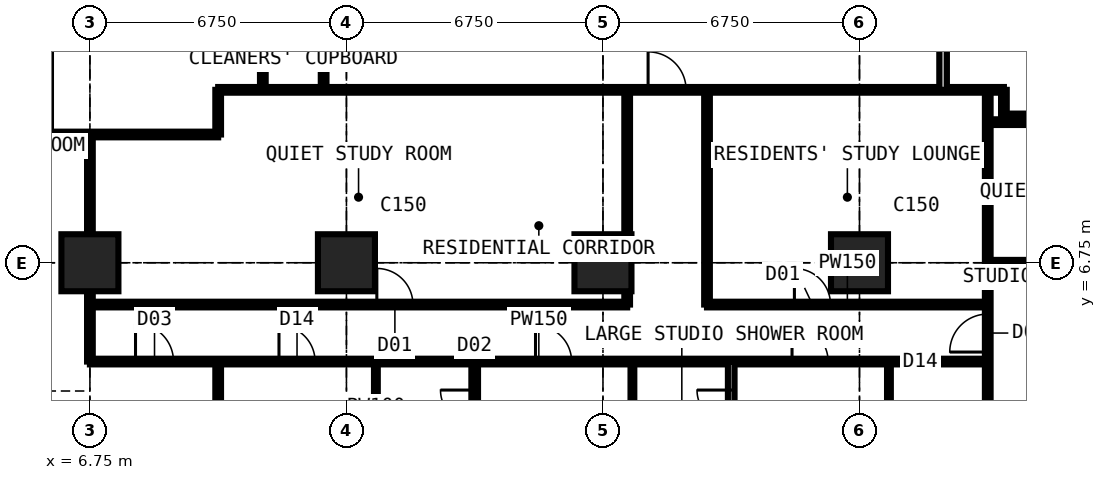
"""IFC4 building model, lengths in metres.
Left out: names, types, materials, properties, quantities, classifications, styles, units other than length and angle.
Written with IfcOpenShell. Run it as: python <this file> out.ifc"""

import sys

from ifc_helpers import new_model, si_unit, direction, frame, frame_2d, origin, origin_2d, place, context, subcontext, project, spatial, rectangle, extrude, element, fill, save


model = new_model("IFC4")
c1 = context("Model", 3, precision=1e-05, world=origin(), true_north=direction((0.0, 1.0)))
c2 = subcontext(c1, "Body", "Model", "MODEL_VIEW")
j1 = project(units=[si_unit("LENGTHUNIT", "METRE"), si_unit("PLANEANGLEUNIT", "RADIAN")], contexts=[c1])
p1 = place(None, origin())
s1 = spatial("IfcSite", under=j1, at=p1, CompositionType="ELEMENT")
p2 = place(p1, origin())
s2 = spatial("IfcBuilding", under=s1, at=p2, CompositionType="ELEMENT")
p3 = place(p2, frame((0.0, 0.0, 112.5)))
s3 = spatial("IfcBuildingStorey", under=s2, at=p3, CompositionType="ELEMENT", Elevation=112.5)
for number, where, z_axis, x_axis in (
    (1, (6.75, 6.75, 0.0), (0.0, 0.0, 1.0), (1.0, 0.0, 0.0)),
    (2, (13.5, 6.75, 0.0), (0.0, 0.0, 1.0), (1.0, 0.0, 0.0)),
    (3, (20.25, 6.75, 0.0), (0.0, 0.0, 1.0), (1.0, 0.0, 0.0)),
    (4, (27.0, 6.75, 0.0), (0.0, 0.0, 1.0), (1.0, 0.0, 0.0)),
):
    element("IfcColumn", number, at=place(p3, frame(where, z_axis=z_axis, x_axis=x_axis)), inside=s3, PredefinedType="COLUMN", context=c2, shape_type="SweptSolid", body=[
        extrude(rectangle(XDim=1.5, YDim=1.5, at=origin_2d()), origin(), (0.0, 0.0, 1.0), 3.6),
    ])
p4 = place(p3, frame((-0.734, 10.125, 0.0), z_axis=(0.0, 0.0, 1.0), x_axis=(1.0, 0.0, 0.0)))
e5 = element("IfcWall", 5, at=p4, inside=s3, PredefinedType="PARTITIONING", context=c2, shape_type="SweptSolid", body=[
    extrude(rectangle(XDim=10.859, YDim=0.15, at=frame_2d((5.429, 0.0))), origin(), (0.0, 0.0, 1.0), 3.375),
])
p5 = place(p3, frame((6.75, 4.15, 0.0), z_axis=(0.0, 0.0, 1.0), x_axis=(0.0, 1.0, 0.0)))
e6 = element("IfcWall", 6, at=p5, inside=s3, PredefinedType="PARTITIONING", context=c2, shape_type="SweptSolid", body=[
    extrude(rectangle(XDim=5.975, YDim=0.15, at=frame_2d((2.988, 0.0))), origin(), (0.0, 0.0, 1.0), 2.877),
])
p6 = place(p3, frame((6.75, 4.15, 0.0), z_axis=(0.0, 0.0, 1.0), x_axis=(1.0, 0.0, 0.0)))
e7 = element("IfcWall", 7, at=p6, inside=s3, PredefinedType="PARTITIONING", context=c2, shape_type="SweptSolid", body=[
    extrude(rectangle(XDim=23.625, YDim=0.15, at=frame_2d((11.812, 0.0))), origin(), (0.0, 0.0, 1.0), 3.375),
])
p7 = place(p6, frame((1.2, 0.0, 0.0)))
e8 = element("IfcOpeningElement", 8, at=p7, cuts=e7, PredefinedType="OPENING", context=c2, shape_type="SweptSolid", body=[
    extrude(rectangle(XDim=1.0, YDim=2.2, at=frame_2d((0.5, 1.1))), frame((0.0, 0.085, 0.0), z_axis=(0.0, -1.0, 0.0), x_axis=(1.0, 0.0, 0.0)), (0.0, 0.0, 1.0), 0.17),
])
p8 = place(p6, frame((18.475, 0.0, 0.0)))
e9 = element("IfcOpeningElement", 9, at=p8, cuts=e7, PredefinedType="OPENING", context=c2, shape_type="SweptSolid", body=[
    extrude(rectangle(XDim=0.95, YDim=2.2, at=frame_2d((0.475, 1.1))), frame((0.0, 0.085, 0.0), z_axis=(0.0, -1.0, 0.0), x_axis=(1.0, 0.0, 0.0)), (0.0, 0.0, 1.0), 0.17),
])
p9 = place(p6, frame((11.725, 0.0, 0.0)))
e10 = element("IfcOpeningElement", 10, at=p9, cuts=e7, PredefinedType="OPENING", context=c2, shape_type="SweptSolid", body=[
    extrude(rectangle(XDim=0.95, YDim=2.2, at=frame_2d((0.475, 1.1))), frame((0.0, 0.085, 0.0), z_axis=(0.0, -1.0, 0.0), x_axis=(1.0, 0.0, 0.0)), (0.0, 0.0, 1.0), 0.17),
])
p10 = place(p6, frame((4.975, 0.0, 0.0)))
e11 = element("IfcOpeningElement", 11, at=p10, cuts=e7, PredefinedType="OPENING", context=c2, shape_type="SweptSolid", body=[
    extrude(rectangle(XDim=0.95, YDim=2.2, at=frame_2d((0.475, 1.1))), frame((0.0, 0.085, 0.0), z_axis=(0.0, -1.0, 0.0), x_axis=(1.0, 0.0, 0.0)), (0.0, 0.0, 1.0), 0.17),
])
p11 = place(p3, frame((6.75, 5.65, 0.0), z_axis=(0.0, 0.0, 1.0), x_axis=(1.0, 0.0, 0.0)))
e12 = element("IfcWall", 12, at=p11, inside=s3, PredefinedType="PARTITIONING", context=c2, shape_type="SweptSolid", body=[
    extrude(rectangle(XDim=14.137, YDim=0.15, at=frame_2d((7.069, 0.0))), origin(), (0.0, 0.0, 1.0), 3.375),
])
p12 = place(p11, frame((7.55, 0.0, 0.0)))
e13 = element("IfcOpeningElement", 13, at=p12, cuts=e12, PredefinedType="OPENING", context=c2, shape_type="SweptSolid", body=[
    extrude(rectangle(XDim=0.95, YDim=2.2, at=frame_2d((0.475, 1.1))), frame((0.0, 0.085, 0.0), z_axis=(0.0, -1.0, 0.0), x_axis=(1.0, 0.0, 0.0)), (0.0, 0.0, 1.0), 0.17),
])
p13 = place(p3, frame((10.125, -0.734, 0.0), z_axis=(0.0, 0.0, 1.0), x_axis=(0.0, 1.0, 0.0)))
e14 = element("IfcWall", 14, at=p13, inside=s3, PredefinedType="PARTITIONING", context=c2, shape_type="SweptSolid", body=[
    extrude(rectangle(XDim=4.884, YDim=0.15, at=frame_2d((2.442, 0.0))), origin(), (0.0, 0.0, 1.0), 3.375),
])
p14 = place(p3, frame((10.125, 10.125, 0.0), z_axis=(0.0, 0.0, 1.0), x_axis=(0.0, 1.0, 0.0)))
e15 = element("IfcWall", 15, at=p14, inside=s3, PredefinedType="PARTITIONING", context=c2, shape_type="SweptSolid", body=[
    extrude(rectangle(XDim=1.175, YDim=0.15, at=frame_2d((0.587, 0.0))), origin(), (0.0, 0.0, 1.0), 3.375),
])
p15 = place(p3, frame((10.125, 11.3, 0.0), z_axis=(0.0, 0.0, 1.0), x_axis=(1.0, 0.0, 0.0)))
e16 = element("IfcWall", 16, at=p15, inside=s3, PredefinedType="PARTITIONING", context=c2, shape_type="SweptSolid", body=[
    extrude(rectangle(XDim=20.675, YDim=0.15, at=frame_2d((10.337, 0.0))), origin(), (0.0, 0.0, 1.0), 3.375),
])
p16 = place(p15, frame((11.312, 0.0, 0.0)))
e17 = element("IfcOpeningElement", 17, at=p16, cuts=e16, PredefinedType="OPENING", context=c2, shape_type="SweptSolid", body=[
    extrude(rectangle(XDim=1.0, YDim=2.2, at=frame_2d((0.5, 1.1))), frame((0.0, 0.085, 0.0), z_axis=(0.0, -1.0, 0.0), x_axis=(1.0, 0.0, 0.0)), (0.0, 0.0, 1.0), 0.17),
])
p17 = place(p3, frame((11.3, 11.3, 0.0), z_axis=(0.0, 0.0, 1.0), x_axis=(0.0, 1.0, 0.0)))
e18 = element("IfcWall", 18, at=p17, inside=s3, PredefinedType="PARTITIONING", context=c2, shape_type="SweptSolid", body=[
    extrude(rectangle(XDim=19.3, YDim=0.15, at=frame_2d((9.65, 0.0))), origin(), (0.0, 0.0, 1.0), 3.375),
])
p18 = place(p17, frame((18.1, 0.0, 0.0)))
e19 = element("IfcOpeningElement", 19, at=p18, cuts=e18, PredefinedType="OPENING", context=c2, shape_type="SweptSolid", body=[
    extrude(rectangle(XDim=1.0, YDim=2.2, at=frame_2d((0.5, 1.1))), frame((0.0, 0.085, 0.0), z_axis=(0.0, -1.0, 0.0), x_axis=(1.0, 0.0, 0.0)), (0.0, 0.0, 1.0), 0.17),
])
p19 = place(p17, frame((10.137, 0.0, 0.0)))
e20 = element("IfcOpeningElement", 20, at=p19, cuts=e18, PredefinedType="OPENING", context=c2, shape_type="SweptSolid", body=[
    extrude(rectangle(XDim=1.0, YDim=2.2, at=frame_2d((0.5, 1.1))), frame((0.0, 0.085, 0.0), z_axis=(0.0, -1.0, 0.0), x_axis=(1.0, 0.0, 0.0)), (0.0, 0.0, 1.0), 0.17),
])
p20 = place(p3, frame((12.9, 11.3, 0.0), z_axis=(0.0, 0.0, 1.0), x_axis=(0.0, 1.0, 0.0)))
e21 = element("IfcWall", 21, at=p20, inside=s3, PredefinedType="PARTITIONING", context=c2, shape_type="SweptSolid", body=[
    extrude(rectangle(XDim=1.6, YDim=0.15, at=frame_2d((0.8, 0.0))), origin(), (0.0, 0.0, 1.0), 3.375),
])
p21 = place(p3, frame((14.275, 1.75, 0.0), z_axis=(0.0, 0.0, 1.0), x_axis=(0.0, 1.0, 0.0)))
e22 = element("IfcWall", 22, at=p21, inside=s3, PredefinedType="PARTITIONING", context=c2, shape_type="SweptSolid", body=[
    extrude(rectangle(XDim=2.4, YDim=0.1, at=frame_2d((1.2, 0.0))), origin(), (0.0, 0.0, 1.0), 3.375),
])
p22 = place(p3, frame((16.875, -0.734, 0.0), z_axis=(0.0, 0.0, 1.0), x_axis=(0.0, 1.0, 0.0)))
e23 = element("IfcWall", 23, at=p22, inside=s3, PredefinedType="PARTITIONING", context=c2, shape_type="SweptSolid", body=[
    extrude(rectangle(XDim=4.884, YDim=0.175, at=frame_2d((2.442, 0.0))), origin(), (0.0, 0.0, 1.0), 3.375),
])
p23 = place(p22, frame((3.234, 0.0, 0.0)))
e24 = element("IfcOpeningElement", 24, at=p23, cuts=e23, PredefinedType="OPENING", context=c2, shape_type="SweptSolid", body=[
    extrude(rectangle(XDim=0.9, YDim=2.2, at=frame_2d((0.45, 1.1))), frame((0.0, 0.097, 0.0), z_axis=(0.0, -1.0, 0.0), x_axis=(1.0, 0.0, 0.0)), (0.0, 0.0, 1.0), 0.195),
])
p24 = place(p3, frame((20.887, 5.65, 0.0), z_axis=(0.0, 0.0, 1.0), x_axis=(0.0, 1.0, 0.0)))
e25 = element("IfcWall", 25, at=p24, inside=s3, PredefinedType="PARTITIONING", context=c2, shape_type="SweptSolid", body=[
    extrude(rectangle(XDim=5.65, YDim=0.15, at=frame_2d((2.825, 0.0))), origin(), (0.0, 0.0, 1.0), 3.375),
])
p25 = place(p3, frame((21.025, 1.75, 0.0), z_axis=(0.0, 0.0, 1.0), x_axis=(0.0, 1.0, 0.0)))
e26 = element("IfcWall", 26, at=p25, inside=s3, PredefinedType="PARTITIONING", context=c2, shape_type="SweptSolid", body=[
    extrude(rectangle(XDim=2.4, YDim=0.1, at=frame_2d((1.2, 0.0))), origin(), (0.0, 0.0, 1.0), 3.375),
])
p26 = place(p3, frame((22.988, 5.65, 0.0), z_axis=(0.0, 0.0, 1.0), x_axis=(1.0, 0.0, 0.0)))
e27 = element("IfcWall", 27, at=p26, inside=s3, PredefinedType="PARTITIONING", context=c2, shape_type="SweptSolid", body=[
    extrude(rectangle(XDim=7.387, YDim=0.15, at=frame_2d((3.694, 0.0))), origin(), (0.0, 0.0, 1.0), 3.375),
])
p27 = place(p26, frame((2.3, 0.0, 0.0)))
e28 = element("IfcOpeningElement", 28, at=p27, cuts=e27, PredefinedType="OPENING", context=c2, shape_type="SweptSolid", body=[
    extrude(rectangle(XDim=0.95, YDim=2.2, at=frame_2d((0.475, 1.1))), frame((0.0, 0.085, 0.0), z_axis=(0.0, -1.0, 0.0), x_axis=(1.0, 0.0, 0.0)), (0.0, 0.0, 1.0), 0.17),
])
p28 = place(p3, frame((22.988, 5.65, 0.0), z_axis=(0.0, 0.0, 1.0), x_axis=(0.0, 1.0, 0.0)))
e29 = element("IfcWall", 29, at=p28, inside=s3, PredefinedType="PARTITIONING", context=c2, shape_type="SweptSolid", body=[
    extrude(rectangle(XDim=5.65, YDim=0.15, at=frame_2d((2.825, 0.0))), origin(), (0.0, 0.0, 1.0), 3.375),
])
p29 = place(p3, frame((23.625, -0.734, 0.0), z_axis=(0.0, 0.0, 1.0), x_axis=(0.0, 1.0, 0.0)))
e30 = element("IfcWall", 30, at=p29, inside=s3, PredefinedType="PARTITIONING", context=c2, shape_type="SweptSolid", body=[
    extrude(rectangle(XDim=4.884, YDim=0.175, at=frame_2d((2.442, 0.0))), origin(), (0.0, 0.0, 1.0), 3.375),
])
p30 = place(p29, frame((3.234, 0.0, 0.0)))
e31 = element("IfcOpeningElement", 31, at=p30, cuts=e30, PredefinedType="OPENING", context=c2, shape_type="SweptSolid", body=[
    extrude(rectangle(XDim=0.9, YDim=2.2, at=frame_2d((0.45, 1.1))), frame((0.0, 0.097, 0.0), z_axis=(0.0, -1.0, 0.0), x_axis=(1.0, 0.0, 0.0)), (0.0, 0.0, 1.0), 0.195),
])
p31 = place(p3, frame((27.775, 1.75, 0.0), z_axis=(0.0, 0.0, 1.0), x_axis=(0.0, 1.0, 0.0)))
e32 = element("IfcWall", 32, at=p31, inside=s3, PredefinedType="PARTITIONING", context=c2, shape_type="SweptSolid", body=[
    extrude(rectangle(XDim=2.4, YDim=0.1, at=frame_2d((1.2, 0.0))), origin(), (0.0, 0.0, 1.0), 3.375),
])
p32 = place(p3, frame((29.2, 11.3, 0.0), z_axis=(0.0, 0.0, 1.0), x_axis=(0.0, 1.0, 0.0)))
e33 = element("IfcWall", 33, at=p32, inside=s3, PredefinedType="PARTITIONING", context=c2, shape_type="SweptSolid", body=[
    extrude(rectangle(XDim=17.9, YDim=0.2, at=frame_2d((8.95, 0.0))), origin(), (0.0, 0.0, 1.0), 3.375),
])
p33 = place(p32, frame((8.35, 0.0, 0.0)))
e34 = element("IfcOpeningElement", 34, at=p33, cuts=e33, PredefinedType="OPENING", context=c2, shape_type="SweptSolid", body=[
    extrude(rectangle(XDim=1.2, YDim=2.2, at=frame_2d((0.6, 1.1))), frame((0.0, 0.11, 0.0), z_axis=(0.0, -1.0, 0.0), x_axis=(1.0, 0.0, 0.0)), (0.0, 0.0, 1.0), 0.22),
])
p34 = place(p3, frame((30.375, -0.734, 0.0), z_axis=(0.0, 0.0, 1.0), x_axis=(0.0, 1.0, 0.0)))
e35 = element("IfcWall", 35, at=p34, inside=s3, PredefinedType="PARTITIONING", context=c2, shape_type="SweptSolid", body=[
    extrude(rectangle(XDim=12.034, YDim=0.15, at=frame_2d((6.017, 0.0))), origin(), (0.0, 0.0, 1.0), 3.375),
])
p35 = place(p34, frame((5.134, 0.0, 0.0)))
e36 = element("IfcOpeningElement", 36, at=p35, cuts=e35, PredefinedType="OPENING", context=c2, shape_type="SweptSolid", body=[
    extrude(rectangle(XDim=1.0, YDim=2.2, at=frame_2d((0.5, 1.1))), frame((0.0, 0.085, 0.0), z_axis=(0.0, -1.0, 0.0), x_axis=(1.0, 0.0, 0.0)), (0.0, 0.0, 1.0), 0.17),
])
p36 = place(p3, frame((30.375, 6.75, 0.0), z_axis=(0.0, 0.0, 1.0), x_axis=(1.0, 0.0, 0.0)))
e37 = element("IfcWall", 37, at=p36, inside=s3, PredefinedType="PARTITIONING", context=c2, shape_type="SweptSolid", body=[
    extrude(rectangle(XDim=5.975, YDim=0.15, at=frame_2d((2.988, 0.0))), origin(), (0.0, 0.0, 1.0), 2.877),
])
p37 = place(p3, frame((30.375, 10.45, 0.0), z_axis=(0.0, 0.0, 1.0), x_axis=(1.0, 0.0, 0.0)))
e38 = element("IfcWall", 38, at=p37, inside=s3, PredefinedType="PARTITIONING", context=c2, shape_type="SweptSolid", body=[
    extrude(rectangle(XDim=4.475, YDim=0.15, at=frame_2d((2.238, 0.0))), origin(), (0.0, 0.0, 1.0), 3.375),
])
p38 = place(p37, frame((2.35, 0.0, 0.0)))
e39 = element("IfcOpeningElement", 39, at=p38, cuts=e38, PredefinedType="OPENING", context=c2, shape_type="SweptSolid", body=[
    extrude(rectangle(XDim=0.95, YDim=2.2, at=frame_2d((0.475, 1.1))), frame((0.0, 0.085, 0.0), z_axis=(0.0, -1.0, 0.0), x_axis=(1.0, 0.0, 0.0)), (0.0, 0.0, 1.0), 0.17),
])
p39 = place(p3, frame((30.8, 10.6, 0.0), z_axis=(0.0, 0.0, 1.0), x_axis=(0.0, 1.0, 0.0)))
e40 = element("IfcWall", 40, at=p39, inside=s3, PredefinedType="PARTITIONING", context=c2, shape_type="SweptSolid", body=[
    extrude(rectangle(XDim=0.7, YDim=0.15, at=frame_2d((0.35, 0.0))), origin(), (0.0, 0.0, 1.0), 3.375),
])
p40 = place(p3, frame((30.8, 10.6, 0.0), z_axis=(0.0, 0.0, 1.0), x_axis=(1.0, 0.0, 0.0)))
e41 = element("IfcWall", 41, at=p40, inside=s3, PredefinedType="PARTITIONING", context=c2, shape_type="SweptSolid", body=[
    extrude(rectangle(XDim=1.85, YDim=0.15, at=frame_2d((0.925, 0.0))), origin(), (0.0, 0.0, 1.0), 3.375),
])
p41 = place(p7, origin())
e42 = element("IfcDoor", 42, at=p41, inside=s3, OperationType="SINGLE_SWING_LEFT", PredefinedType="DOOR", context=c2, shape_type="SweptSolid", body=[
    extrude(rectangle(XDim=1.0, YDim=2.2, at=frame_2d((0.5, 1.1))), frame((0.0, 0.025, 0.0), z_axis=(0.0, -1.0, 0.0), x_axis=(1.0, 0.0, 0.0)), (0.0, 0.0, 1.0), 0.05),
])
fill(e8, e42)
p42 = place(p8, origin())
e43 = element("IfcDoor", 43, at=p42, inside=s3, OperationType="SINGLE_SWING_LEFT", PredefinedType="DOOR", context=c2, shape_type="SweptSolid", body=[
    extrude(rectangle(XDim=0.95, YDim=2.2, at=frame_2d((0.475, 1.1))), frame((0.0, 0.025, 0.0), z_axis=(0.0, -1.0, 0.0), x_axis=(1.0, 0.0, 0.0)), (0.0, 0.0, 1.0), 0.05),
])
fill(e9, e43)
p43 = place(p9, origin())
e44 = element("IfcDoor", 44, at=p43, inside=s3, OperationType="SINGLE_SWING_LEFT", PredefinedType="DOOR", context=c2, shape_type="SweptSolid", body=[
    extrude(rectangle(XDim=0.95, YDim=2.2, at=frame_2d((0.475, 1.1))), frame((0.0, 0.025, 0.0), z_axis=(0.0, -1.0, 0.0), x_axis=(1.0, 0.0, 0.0)), (0.0, 0.0, 1.0), 0.05),
])
fill(e10, e44)
p44 = place(p30, origin())
e45 = element("IfcDoor", 45, at=p44, inside=s3, OperationType="SINGLE_SWING_RIGHT", PredefinedType="DOOR", context=c2, shape_type="SweptSolid", body=[
    extrude(rectangle(XDim=0.9, YDim=2.2, at=frame_2d((0.45, 1.1))), frame((0.0, 0.025, 0.0), z_axis=(0.0, -1.0, 0.0), x_axis=(1.0, 0.0, 0.0)), (0.0, 0.0, 1.0), 0.05),
])
fill(e31, e45)
p45 = place(p10, origin())
e46 = element("IfcDoor", 46, at=p45, inside=s3, OperationType="SINGLE_SWING_LEFT", PredefinedType="DOOR", context=c2, shape_type="SweptSolid", body=[
    extrude(rectangle(XDim=0.95, YDim=2.2, at=frame_2d((0.475, 1.1))), frame((0.0, 0.025, 0.0), z_axis=(0.0, -1.0, 0.0), x_axis=(1.0, 0.0, 0.0)), (0.0, 0.0, 1.0), 0.05),
])
fill(e11, e46)
p46 = place(p23, origin())
e47 = element("IfcDoor", 47, at=p46, inside=s3, OperationType="SINGLE_SWING_RIGHT", PredefinedType="DOOR", context=c2, shape_type="SweptSolid", body=[
    extrude(rectangle(XDim=0.9, YDim=2.2, at=frame_2d((0.45, 1.1))), frame((0.0, 0.025, 0.0), z_axis=(0.0, -1.0, 0.0), x_axis=(1.0, 0.0, 0.0)), (0.0, 0.0, 1.0), 0.05),
])
fill(e24, e47)
p47 = place(p16, origin())
e48 = element("IfcDoor", 48, at=p47, inside=s3, OperationType="SINGLE_SWING_LEFT", PredefinedType="DOOR", context=c2, shape_type="SweptSolid", body=[
    extrude(rectangle(XDim=1.0, YDim=2.2, at=frame_2d((0.5, 1.1))), frame((0.0, 0.025, 0.0), z_axis=(0.0, -1.0, 0.0), x_axis=(1.0, 0.0, 0.0)), (0.0, 0.0, 1.0), 0.05),
])
fill(e17, e48)
p48 = place(p27, origin())
e49 = element("IfcDoor", 49, at=p48, inside=s3, OperationType="SINGLE_SWING_LEFT", PredefinedType="DOOR", context=c2, shape_type="SweptSolid", body=[
    extrude(rectangle(XDim=0.95, YDim=2.2, at=frame_2d((0.475, 1.1))), frame((0.0, 0.025, 0.0), z_axis=(0.0, -1.0, 0.0), x_axis=(1.0, 0.0, 0.0)), (0.0, 0.0, 1.0), 0.05),
])
fill(e28, e49)
p49 = place(p12, origin())
e50 = element("IfcDoor", 50, at=p49, inside=s3, OperationType="SINGLE_SWING_LEFT", PredefinedType="DOOR", context=c2, shape_type="SweptSolid", body=[
    extrude(rectangle(XDim=0.95, YDim=2.2, at=frame_2d((0.475, 1.1))), frame((0.0, 0.025, 0.0), z_axis=(0.0, -1.0, 0.0), x_axis=(1.0, 0.0, 0.0)), (0.0, 0.0, 1.0), 0.05),
])
fill(e13, e50)
p50 = place(p35, origin())
e51 = element("IfcDoor", 51, at=p50, inside=s3, OperationType="SINGLE_SWING_LEFT", PredefinedType="DOOR", context=c2, shape_type="SweptSolid", body=[
    extrude(rectangle(XDim=1.0, YDim=2.2, at=frame_2d((0.5, 1.1))), frame((0.0, 0.025, 0.0), z_axis=(0.0, -1.0, 0.0), x_axis=(1.0, 0.0, 0.0)), (0.0, 0.0, 1.0), 0.05),
])
fill(e36, e51)
save(model, sys.argv[1])
